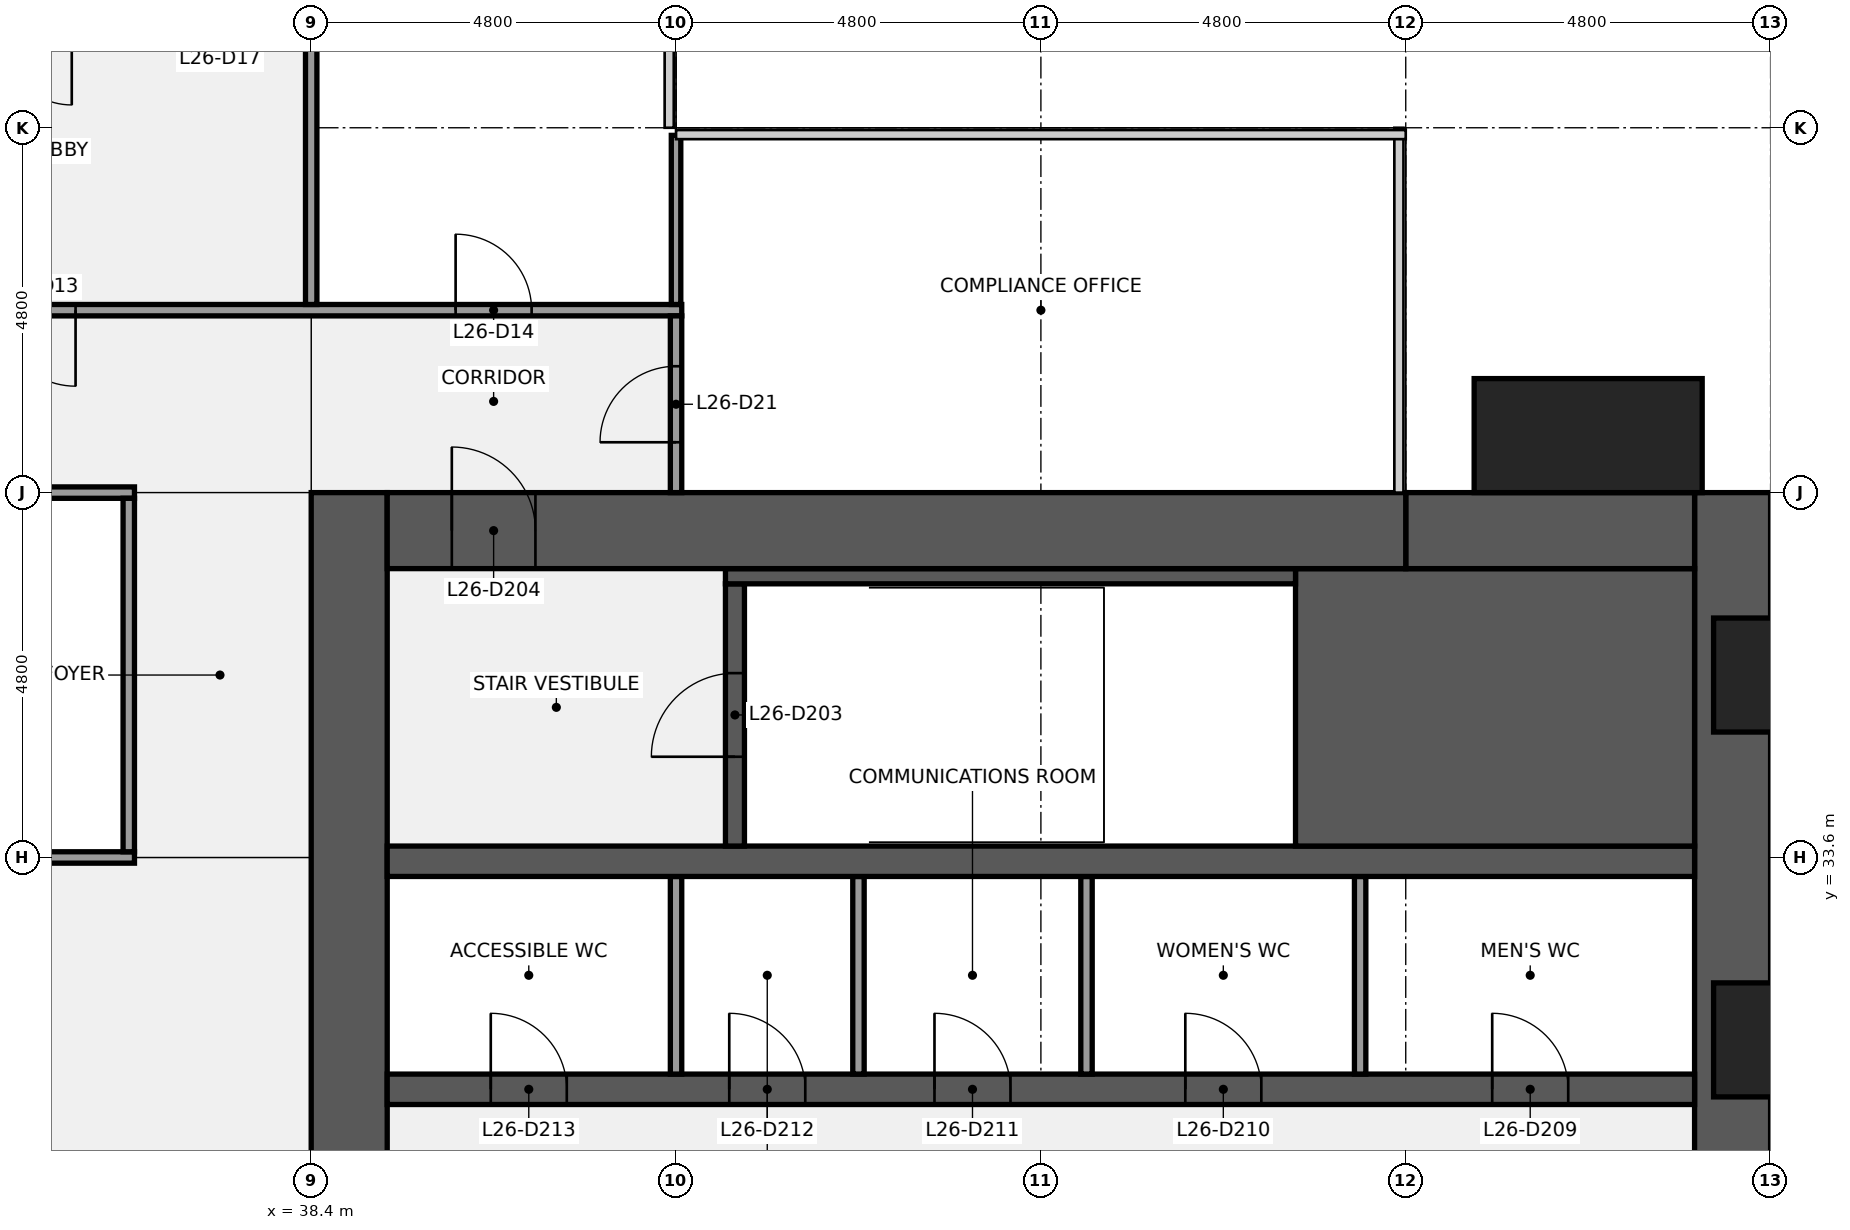
"""IFC4 building model, lengths in metres.
Left out: names, types, materials, properties, quantities, classifications, styles, units other than length and angle.
Written with IfcOpenShell. Run it as: python <this file> out.ifc"""

import sys

from ifc_helpers import new_model, si_unit, direction, frame, frame_2d, origin, origin_2d, place, context, subcontext, project, spatial, rectangle, extrude, element, fill, save


model = new_model("IFC4")
c1 = context("Model", 3, precision=1e-05, world=origin(), true_north=direction((0.0, 1.0)))
c2 = subcontext(c1, "Body", "Model", "MODEL_VIEW")
j1 = project(units=[si_unit("LENGTHUNIT", "METRE"), si_unit("PLANEANGLEUNIT", "RADIAN")], contexts=[c1])
p1 = place(None, origin())
s1 = spatial("IfcSite", under=j1, at=p1, CompositionType="ELEMENT")
p2 = place(p1, origin())
s2 = spatial("IfcBuilding", under=s1, at=p2, CompositionType="ELEMENT")
p3 = place(p2, frame((0.0, 0.0, 124.1)))
s3 = spatial("IfcBuildingStorey", under=s2, at=p3, CompositionType="ELEMENT", Elevation=124.1)
p4 = place(p3, frame((57.1, 38.4, 0.0), z_axis=(0.0, 0.0, 1.0), x_axis=(0.0, -1.0, 0.0)))
e1 = element("IfcWall", 1, at=p4, inside=s3, PredefinedType="SHEAR", context=c2, shape_type="SweptSolid", body=[
    extrude(rectangle(XDim=28.8, YDim=1.0, at=frame_2d((14.4, 0.0))), origin(), (0.0, 0.0, 1.0), 3.84),
])
p5 = place(p4, frame((18.45, 0.0, 0.9)))
e2 = element("IfcOpeningElement", 2, at=p5, cuts=e1, PredefinedType="OPENING", context=c2, shape_type="SweptSolid", body=[
    extrude(rectangle(XDim=1.5, YDim=1.5, at=frame_2d((0.75, 0.75))), frame((0.0, 0.51, 0.0), z_axis=(0.0, -1.0, 0.0), x_axis=(1.0, 0.0, 0.0)), (0.0, 0.0, 1.0), 1.02),
])
p6 = place(p4, frame((8.85, 0.0, 0.9)))
e3 = element("IfcOpeningElement", 3, at=p6, cuts=e1, PredefinedType="OPENING", context=c2, shape_type="SweptSolid", body=[
    extrude(rectangle(XDim=1.5, YDim=1.5, at=frame_2d((0.75, 0.75))), frame((0.0, 0.51, 0.0), z_axis=(0.0, -1.0, 0.0), x_axis=(1.0, 0.0, 0.0)), (0.0, 0.0, 1.0), 1.02),
])
p7 = place(p3, frame((38.9, 9.6, 0.0), z_axis=(0.0, 0.0, 1.0), x_axis=(0.0, 1.0, 0.0)))
e4 = element("IfcWall", 4, at=p7, inside=s3, PredefinedType="SHEAR", context=c2, shape_type="SweptSolid", body=[
    extrude(rectangle(XDim=28.8, YDim=1.0, at=frame_2d((14.4, 0.0))), origin(), (0.0, 0.0, 1.0), 3.84),
])
p8 = place(p7, frame((8.7, 0.0, 0.0)))
e5 = element("IfcOpeningElement", 5, at=p8, cuts=e4, PredefinedType="OPENING", context=c2, shape_type="SweptSolid", body=[
    extrude(rectangle(XDim=1.8, YDim=2.1, at=frame_2d((0.9, 1.05))), frame((0.0, 0.51, 0.0), z_axis=(0.0, -1.0, 0.0), x_axis=(1.0, 0.0, 0.0)), (0.0, 0.0, 1.0), 1.02),
])
p9 = place(p7, frame((18.3, 0.0, 0.0)))
e6 = element("IfcOpeningElement", 6, at=p9, cuts=e4, PredefinedType="OPENING", context=c2, shape_type="SweptSolid", body=[
    extrude(rectangle(XDim=1.8, YDim=2.1, at=frame_2d((0.9, 1.05))), frame((0.0, 0.51, 0.0), z_axis=(0.0, -1.0, 0.0), x_axis=(1.0, 0.0, 0.0)), (0.0, 0.0, 1.0), 1.02),
])
p10 = place(p3, frame((39.4, 30.55, 0.0), z_axis=(0.0, 0.0, 1.0), x_axis=(1.0, 0.0, 0.0)))
e7 = element("IfcWall", 7, at=p10, inside=s3, PredefinedType="SHEAR", context=c2, shape_type="SweptSolid", body=[
    extrude(rectangle(XDim=17.2, YDim=0.4, at=frame_2d((8.6, 0.0))), origin(), (0.0, 0.0, 1.0), 3.84),
])
p11 = place(p10, frame((14.538, 0.0, 0.0)))
e8 = element("IfcOpeningElement", 8, at=p11, cuts=e7, PredefinedType="OPENING", context=c2, shape_type="SweptSolid", body=[
    extrude(rectangle(XDim=1.0, YDim=2.1, at=frame_2d((0.5, 1.05))), frame((0.0, 0.21, 0.0), z_axis=(0.0, -1.0, 0.0), x_axis=(1.0, 0.0, 0.0)), (0.0, 0.0, 1.0), 0.42),
])
p12 = place(p10, frame((10.5, 0.0, 0.0)))
e9 = element("IfcOpeningElement", 9, at=p12, cuts=e7, PredefinedType="OPENING", context=c2, shape_type="SweptSolid", body=[
    extrude(rectangle(XDim=1.0, YDim=2.1, at=frame_2d((0.5, 1.05))), frame((0.0, 0.21, 0.0), z_axis=(0.0, -1.0, 0.0), x_axis=(1.0, 0.0, 0.0)), (0.0, 0.0, 1.0), 0.42),
])
p13 = place(p10, frame((7.2, 0.0, 0.0)))
e10 = element("IfcOpeningElement", 10, at=p13, cuts=e7, PredefinedType="OPENING", context=c2, shape_type="SweptSolid", body=[
    extrude(rectangle(XDim=1.0, YDim=2.1, at=frame_2d((0.5, 1.05))), frame((0.0, 0.21, 0.0), z_axis=(0.0, -1.0, 0.0), x_axis=(1.0, 0.0, 0.0)), (0.0, 0.0, 1.0), 0.42),
])
p14 = place(p10, frame((4.5, 0.0, 0.0)))
e11 = element("IfcOpeningElement", 11, at=p14, cuts=e7, PredefinedType="OPENING", context=c2, shape_type="SweptSolid", body=[
    extrude(rectangle(XDim=1.0, YDim=2.1, at=frame_2d((0.5, 1.05))), frame((0.0, 0.21, 0.0), z_axis=(0.0, -1.0, 0.0), x_axis=(1.0, 0.0, 0.0)), (0.0, 0.0, 1.0), 0.42),
])
p15 = place(p10, frame((1.363, 0.0, 0.0)))
e12 = element("IfcOpeningElement", 12, at=p15, cuts=e7, PredefinedType="OPENING", context=c2, shape_type="SweptSolid", body=[
    extrude(rectangle(XDim=1.0, YDim=2.1, at=frame_2d((0.5, 1.05))), frame((0.0, 0.21, 0.0), z_axis=(0.0, -1.0, 0.0), x_axis=(1.0, 0.0, 0.0)), (0.0, 0.0, 1.0), 0.42),
])
for number, where, z_axis, x_axis in (
    (13, (52.2, 30.75, 0.0), (0.0, 0.0, 1.0), (0.0, 1.0, 0.0)),
    (14, (48.6, 30.75, 0.0), (0.0, 0.0, 1.0), (0.0, 1.0, 0.0)),
    (15, (45.6, 30.75, 0.0), (0.0, 0.0, 1.0), (0.0, 1.0, 0.0)),
    (16, (43.2, 30.75, 0.0), (0.0, 0.0, 1.0), (0.0, 1.0, 0.0)),
):
    element("IfcWall", number, at=place(p3, frame(where, z_axis=z_axis, x_axis=x_axis)), inside=s3, PredefinedType="PARTITIONING", context=c2, shape_type="SweptSolid", body=[
        extrude(rectangle(XDim=2.6, YDim=0.15, at=frame_2d((1.3, 0.0))), origin(), (0.0, 0.0, 1.0), 3.84),
    ])
p16 = place(p3, frame((39.4, 33.55, 0.0), z_axis=(0.0, 0.0, 1.0), x_axis=(1.0, 0.0, 0.0)))
e17 = element("IfcWall", 17, at=p16, inside=s3, PredefinedType="SHEAR", context=c2, shape_type="SweptSolid", body=[
    extrude(rectangle(XDim=17.2, YDim=0.4, at=frame_2d((8.6, 0.0))), origin(), (0.0, 0.0, 1.0), 3.84),
])
p17 = place(p3, frame((51.35, 35.575, 0.0), z_axis=(0.0, 0.0, 1.0), x_axis=(1.0, 0.0, 0.0)))
e18 = element("IfcWall", 18, at=p17, inside=s3, PredefinedType="SHEAR", context=c2, shape_type="SweptSolid", body=[
    extrude(rectangle(XDim=5.25, YDim=3.65, at=frame_2d((2.625, 0.0))), origin(), (0.0, 0.0, 1.0), 3.84),
])
p18 = place(p3, frame((43.975, 33.75, 0.0), z_axis=(0.0, 0.0, 1.0), x_axis=(0.0, 1.0, 0.0)))
e19 = element("IfcWall", 19, at=p18, inside=s3, PredefinedType="SHEAR", context=c2, shape_type="SweptSolid", body=[
    extrude(rectangle(XDim=3.45, YDim=0.25, at=frame_2d((1.725, 0.0))), origin(), (0.0, 0.0, 1.0), 3.84),
])
p19 = place(p18, frame((1.175, 0.0, 0.0)))
e20 = element("IfcOpeningElement", 20, at=p19, cuts=e19, PredefinedType="OPENING", context=c2, shape_type="SweptSolid", body=[
    extrude(rectangle(XDim=1.1, YDim=2.1, at=frame_2d((0.55, 1.05))), frame((0.0, 0.135, 0.0), z_axis=(0.0, -1.0, 0.0), x_axis=(1.0, 0.0, 0.0)), (0.0, 0.0, 1.0), 0.27),
])
p20 = place(p3, frame((43.85, 37.3, 0.0), z_axis=(0.0, 0.0, 1.0), x_axis=(1.0, 0.0, 0.0)))
e21 = element("IfcWall", 21, at=p20, inside=s3, PredefinedType="SHEAR", context=c2, shape_type="SweptSolid", body=[
    extrude(rectangle(XDim=7.5, YDim=0.2, at=frame_2d((3.75, 0.0))), origin(), (0.0, 0.0, 1.0), 3.84),
])
p21 = place(p3, frame((52.8, 37.9, 0.0), z_axis=(0.0, 0.0, 1.0), x_axis=(1.0, 0.0, 0.0)))
e22 = element("IfcWall", 22, at=p21, inside=s3, PredefinedType="SHEAR", context=c2, shape_type="SweptSolid", body=[
    extrude(rectangle(XDim=3.8, YDim=1.0, at=frame_2d((1.9, 0.0))), origin(), (0.0, 0.0, 1.0), 3.84),
])
p22 = place(p3, frame((39.4, 37.9, 0.0), z_axis=(0.0, 0.0, 1.0), x_axis=(1.0, 0.0, 0.0)))
e23 = element("IfcWall", 23, at=p22, inside=s3, PredefinedType="SHEAR", context=c2, shape_type="SweptSolid", body=[
    extrude(rectangle(XDim=13.4, YDim=1.0, at=frame_2d((6.7, 0.0))), origin(), (0.0, 0.0, 1.0), 3.84),
])
p23 = place(p22, frame((0.85, 0.0, 0.0)))
e24 = element("IfcOpeningElement", 24, at=p23, cuts=e23, PredefinedType="OPENING", context=c2, shape_type="SweptSolid", body=[
    extrude(rectangle(XDim=1.1, YDim=2.1, at=frame_2d((0.55, 1.05))), frame((0.0, 0.51, 0.0), z_axis=(0.0, -1.0, 0.0), x_axis=(1.0, 0.0, 0.0)), (0.0, 0.0, 1.0), 1.02),
])
p24 = place(p3, frame((33.675, 33.6, 0.0), z_axis=(0.0, 0.0, 1.0), x_axis=(1.0, 0.0, 0.0)))
e25 = element("IfcWall", 25, at=p24, inside=s3, PredefinedType="PARTITIONING", context=c2, shape_type="SweptSolid", body=[
    extrude(rectangle(XDim=2.4, YDim=0.15, at=frame_2d((1.2, 0.0))), origin(), (0.0, 0.0, 1.0), 2.849),
])
p25 = place(p3, frame((21.525, 38.4, 0.0), z_axis=(0.0, 0.0, 1.0), x_axis=(1.0, 0.0, 0.0)))
e26 = element("IfcWall", 26, at=p25, inside=s3, PredefinedType="PARTITIONING", context=c2, shape_type="SweptSolid", body=[
    extrude(rectangle(XDim=14.55, YDim=0.15, at=frame_2d((7.275, 0.0))), origin(), (0.0, 0.0, 1.0), 2.849),
])
p26 = place(p25, frame((3.175, 0.0, 0.0)))
e27 = element("IfcOpeningElement", 27, at=p26, cuts=e26, PredefinedType="OPENING", context=c2, shape_type="SweptSolid", body=[
    extrude(rectangle(XDim=1.0, YDim=2.1, at=frame_2d((0.5, 1.05))), frame((0.0, 0.085, 0.0), z_axis=(0.0, -1.0, 0.0), x_axis=(1.0, 0.0, 0.0)), (0.0, 0.0, 1.0), 0.17),
])
p27 = place(p25, frame((10.375, 0.0, 0.0)))
e28 = element("IfcOpeningElement", 28, at=p27, cuts=e26, PredefinedType="OPENING", context=c2, shape_type="SweptSolid", body=[
    extrude(rectangle(XDim=1.0, YDim=2.1, at=frame_2d((0.5, 1.05))), frame((0.0, 0.085, 0.0), z_axis=(0.0, -1.0, 0.0), x_axis=(1.0, 0.0, 0.0)), (0.0, 0.0, 1.0), 0.17),
])
p28 = place(p3, frame((14.325, 40.8, 0.0), z_axis=(0.0, 0.0, 1.0), x_axis=(1.0, 0.0, 0.0)))
e29 = element("IfcWall", 29, at=p28, inside=s3, PredefinedType="PARTITIONING", context=c2, shape_type="SweptSolid", body=[
    extrude(rectangle(XDim=28.95, YDim=0.15, at=frame_2d((14.475, 0.0))), origin(), (0.0, 0.0, 1.0), 2.849),
])
p29 = place(p28, frame((1.975, 0.0, 0.0)))
e30 = element("IfcOpeningElement", 30, at=p29, cuts=e29, PredefinedType="OPENING", context=c2, shape_type="SweptSolid", body=[
    extrude(rectangle(XDim=1.0, YDim=2.1, at=frame_2d((0.5, 1.05))), frame((0.0, 0.085, 0.0), z_axis=(0.0, -1.0, 0.0), x_axis=(1.0, 0.0, 0.0)), (0.0, 0.0, 1.0), 0.17),
])
p30 = place(p28, frame((9.175, 0.0, 0.0)))
e31 = element("IfcOpeningElement", 31, at=p30, cuts=e29, PredefinedType="OPENING", context=c2, shape_type="SweptSolid", body=[
    extrude(rectangle(XDim=1.0, YDim=2.1, at=frame_2d((0.5, 1.05))), frame((0.0, 0.085, 0.0), z_axis=(0.0, -1.0, 0.0), x_axis=(1.0, 0.0, 0.0)), (0.0, 0.0, 1.0), 0.17),
])
p31 = place(p28, frame((15.175, 0.0, 0.0)))
e32 = element("IfcOpeningElement", 32, at=p31, cuts=e29, PredefinedType="OPENING", context=c2, shape_type="SweptSolid", body=[
    extrude(rectangle(XDim=1.0, YDim=2.1, at=frame_2d((0.5, 1.05))), frame((0.0, 0.085, 0.0), z_axis=(0.0, -1.0, 0.0), x_axis=(1.0, 0.0, 0.0)), (0.0, 0.0, 1.0), 0.17),
])
p32 = place(p28, frame((19.975, 0.0, 0.0)))
e33 = element("IfcOpeningElement", 33, at=p32, cuts=e29, PredefinedType="OPENING", context=c2, shape_type="SweptSolid", body=[
    extrude(rectangle(XDim=1.0, YDim=2.1, at=frame_2d((0.5, 1.05))), frame((0.0, 0.085, 0.0), z_axis=(0.0, -1.0, 0.0), x_axis=(1.0, 0.0, 0.0)), (0.0, 0.0, 1.0), 0.17),
])
p33 = place(p28, frame((25.975, 0.0, 0.0)))
e34 = element("IfcOpeningElement", 34, at=p33, cuts=e29, PredefinedType="OPENING", context=c2, shape_type="SweptSolid", body=[
    extrude(rectangle(XDim=1.0, YDim=2.1, at=frame_2d((0.5, 1.05))), frame((0.0, 0.085, 0.0), z_axis=(0.0, -1.0, 0.0), x_axis=(1.0, 0.0, 0.0)), (0.0, 0.0, 1.0), 0.17),
])
p34 = place(p3, frame((36.0, 33.675, 0.0), z_axis=(0.0, 0.0, 1.0), x_axis=(0.0, 1.0, 0.0)))
e35 = element("IfcWall", 35, at=p34, inside=s3, PredefinedType="PARTITIONING", context=c2, shape_type="SweptSolid", body=[
    extrude(rectangle(XDim=4.65, YDim=0.15, at=frame_2d((2.325, 0.0))), origin(), (0.0, 0.0, 1.0), 2.849),
])
p35 = place(p3, frame((38.4, 40.875, 0.0), z_axis=(0.0, 0.0, 1.0), x_axis=(0.0, 1.0, 0.0)))
e36 = element("IfcWall", 36, at=p35, inside=s3, PredefinedType="PARTITIONING", context=c2, shape_type="SweptSolid", body=[
    extrude(rectangle(XDim=3.45, YDim=0.15, at=frame_2d((1.725, 0.0))), origin(), (0.0, 0.0, 1.0), 2.849),
])
p36 = place(p3, frame((43.2, 40.875, 0.0), z_axis=(0.0, 0.0, 1.0), x_axis=(0.0, 1.0, 0.0)))
e37 = element("IfcWall", 37, at=p36, inside=s3, PredefinedType="PARTITIONING", context=c2, shape_type="SweptSolid", body=[
    extrude(rectangle(XDim=2.225, YDim=0.125, at=frame_2d((1.113, 0.0))), origin(), (0.0, 0.0, 1.0), 2.849),
])
p37 = place(p3, frame((43.2, 38.4, 0.0), z_axis=(0.0, 0.0, 1.0), x_axis=(0.0, 1.0, 0.0)))
e38 = element("IfcWall", 38, at=p37, inside=s3, PredefinedType="PARTITIONING", context=c2, shape_type="SweptSolid", body=[
    extrude(rectangle(XDim=2.325, YDim=0.15, at=frame_2d((1.163, 0.0))), origin(), (0.0, 0.0, 1.0), 2.849),
])
p38 = place(p37, frame((0.663, 0.0, 0.0)))
e39 = element("IfcOpeningElement", 39, at=p38, cuts=e38, PredefinedType="OPENING", context=c2, shape_type="SweptSolid", body=[
    extrude(rectangle(XDim=1.0, YDim=2.1, at=frame_2d((0.5, 1.05))), frame((0.0, 0.085, 0.0), z_axis=(0.0, -1.0, 0.0), x_axis=(1.0, 0.0, 0.0)), (0.0, 0.0, 1.0), 0.17),
])
p39 = place(p3, frame((55.2, 39.15, 0.0), z_axis=(0.0, 0.0, 1.0), x_axis=(1.0, 0.0, 0.0)))
e40 = element("IfcColumn", 40, at=p39, inside=s3, PredefinedType="PILASTER", context=c2, shape_type="SweptSolid", body=[
    extrude(rectangle(XDim=3.0, YDim=1.5, at=origin_2d()), origin(), (0.0, 0.0, 1.0), 4.0),
])
p40 = place(p19, origin())
e41 = element("IfcDoor", 41, at=p40, inside=s3, OperationType="SINGLE_SWING_LEFT", PredefinedType="DOOR", context=c2, shape_type="SweptSolid", body=[
    extrude(rectangle(XDim=1.1, YDim=2.1, at=frame_2d((0.55, 1.05))), frame((0.0, 0.025, 0.0), z_axis=(0.0, -1.0, 0.0), x_axis=(1.0, 0.0, 0.0)), (0.0, 0.0, 1.0), 0.05),
])
fill(e20, e41)
p41 = place(p23, origin())
e42 = element("IfcDoor", 42, at=p41, inside=s3, OperationType="SINGLE_SWING_LEFT", PredefinedType="DOOR", context=c2, shape_type="SweptSolid", body=[
    extrude(rectangle(XDim=1.1, YDim=2.1, at=frame_2d((0.55, 1.05))), frame((0.0, 0.025, 0.0), z_axis=(0.0, -1.0, 0.0), x_axis=(1.0, 0.0, 0.0)), (0.0, 0.0, 1.0), 0.05),
])
fill(e24, e42)
p42 = place(p11, origin())
e43 = element("IfcDoor", 43, at=p42, inside=s3, OperationType="SINGLE_SWING_LEFT", PredefinedType="DOOR", context=c2, shape_type="SweptSolid", body=[
    extrude(rectangle(XDim=1.0, YDim=2.1, at=frame_2d((0.5, 1.05))), frame((0.0, 0.025, 0.0), z_axis=(0.0, -1.0, 0.0), x_axis=(1.0, 0.0, 0.0)), (0.0, 0.0, 1.0), 0.05),
])
fill(e8, e43)
p43 = place(p12, origin())
e44 = element("IfcDoor", 44, at=p43, inside=s3, OperationType="SINGLE_SWING_LEFT", PredefinedType="DOOR", context=c2, shape_type="SweptSolid", body=[
    extrude(rectangle(XDim=1.0, YDim=2.1, at=frame_2d((0.5, 1.05))), frame((0.0, 0.025, 0.0), z_axis=(0.0, -1.0, 0.0), x_axis=(1.0, 0.0, 0.0)), (0.0, 0.0, 1.0), 0.05),
])
fill(e9, e44)
p44 = place(p13, origin())
e45 = element("IfcDoor", 45, at=p44, inside=s3, OperationType="SINGLE_SWING_LEFT", PredefinedType="DOOR", context=c2, shape_type="SweptSolid", body=[
    extrude(rectangle(XDim=1.0, YDim=2.1, at=frame_2d((0.5, 1.05))), frame((0.0, 0.025, 0.0), z_axis=(0.0, -1.0, 0.0), x_axis=(1.0, 0.0, 0.0)), (0.0, 0.0, 1.0), 0.05),
])
fill(e10, e45)
p45 = place(p14, origin())
e46 = element("IfcDoor", 46, at=p45, inside=s3, OperationType="SINGLE_SWING_LEFT", PredefinedType="DOOR", context=c2, shape_type="SweptSolid", body=[
    extrude(rectangle(XDim=1.0, YDim=2.1, at=frame_2d((0.5, 1.05))), frame((0.0, 0.025, 0.0), z_axis=(0.0, -1.0, 0.0), x_axis=(1.0, 0.0, 0.0)), (0.0, 0.0, 1.0), 0.05),
])
fill(e11, e46)
p46 = place(p15, origin())
e47 = element("IfcDoor", 47, at=p46, inside=s3, OperationType="SINGLE_SWING_LEFT", PredefinedType="DOOR", context=c2, shape_type="SweptSolid", body=[
    extrude(rectangle(XDim=1.0, YDim=2.1, at=frame_2d((0.5, 1.05))), frame((0.0, 0.025, 0.0), z_axis=(0.0, -1.0, 0.0), x_axis=(1.0, 0.0, 0.0)), (0.0, 0.0, 1.0), 0.05),
])
fill(e12, e47)
p47 = place(p32, origin())
e48 = element("IfcDoor", 48, at=p47, inside=s3, OperationType="SINGLE_SWING_RIGHT", PredefinedType="DOOR", context=c2, shape_type="SweptSolid", body=[
    extrude(rectangle(XDim=1.0, YDim=2.1, at=frame_2d((0.5, 1.05))), frame((0.0, 0.025, 0.0), z_axis=(0.0, -1.0, 0.0), x_axis=(1.0, 0.0, 0.0)), (0.0, 0.0, 1.0), 0.05),
])
fill(e33, e48)
p48 = place(p33, origin())
e49 = element("IfcDoor", 49, at=p48, inside=s3, OperationType="SINGLE_SWING_LEFT", PredefinedType="DOOR", context=c2, shape_type="SweptSolid", body=[
    extrude(rectangle(XDim=1.0, YDim=2.1, at=frame_2d((0.5, 1.05))), frame((0.0, 0.025, 0.0), z_axis=(0.0, -1.0, 0.0), x_axis=(1.0, 0.0, 0.0)), (0.0, 0.0, 1.0), 0.05),
])
fill(e34, e49)
p49 = place(p38, origin())
e50 = element("IfcDoor", 50, at=p49, inside=s3, OperationType="SINGLE_SWING_LEFT", PredefinedType="DOOR", context=c2, shape_type="SweptSolid", body=[
    extrude(rectangle(XDim=1.0, YDim=2.1, at=frame_2d((0.5, 1.05))), frame((0.0, 0.025, 0.0), z_axis=(0.0, -1.0, 0.0), x_axis=(1.0, 0.0, 0.0)), (0.0, 0.0, 1.0), 0.05),
])
fill(e39, e50)
save(model, sys.argv[1])
